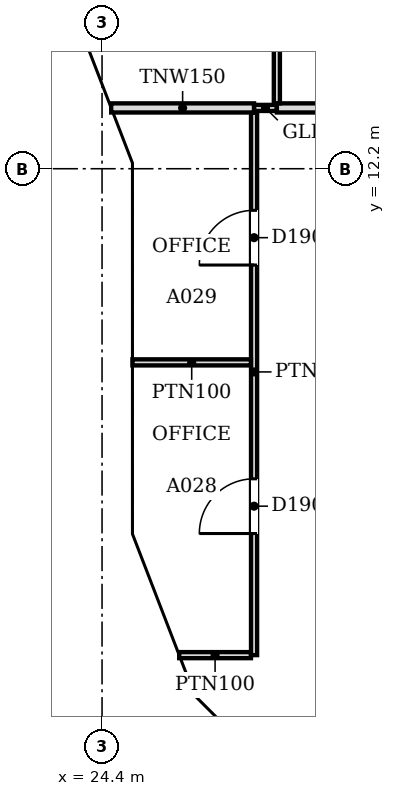
"""IFC4 building model, lengths in metres.
Left out: names, types, materials, properties, quantities, classifications, styles, units other than length and angle.
Written with IfcOpenShell. Run it as: python <this file> out.ifc"""

import sys

from ifc_helpers import new_model, si_unit, direction, frame, frame_2d, origin, place, context, subcontext, project, spatial, polyline, rectangle, outline, extrude, faceted_brep, source, transform, mapped, element, fill, save


model = new_model("IFC4")
c1 = context("Model", 3, precision=1e-05, world=origin(), true_north=direction((0.0, 1.0)))
c2 = subcontext(c1, "Body", "Model", "MODEL_VIEW")
j1 = project(units=[si_unit("LENGTHUNIT", "METRE"), si_unit("PLANEANGLEUNIT", "RADIAN")], contexts=[c1])
p1 = place(None, origin())
s1 = spatial("IfcSite", under=j1, at=p1, CompositionType="ELEMENT")
p2 = place(p1, origin())
s2 = spatial("IfcBuilding", under=s1, at=p2, CompositionType="ELEMENT")
p3 = place(p2, frame((0.0, 0.0, 112.6)))
s3 = spatial("IfcBuildingStorey", under=s2, at=p3, CompositionType="ELEMENT", Elevation=112.6)
m1 = source(origin(), c2, "Body", "Brep", [
    faceted_brep([(3.156, -0.25, 0.056), (0.106, -0.25, 3.736), (0.106, -0.25, 0.0), (3.156, -0.25, 0.0), (0.0, 0.25, 3.736), (0.053, 0.25, 3.8), (3.202, 0.25, 0.0), (0.0, 0.25, 0.0), (0.053, 0.0, 3.8), (3.202, -0.0, 0.0)], [[[0, 1, 2, 3]], [[4, 5, 6, 7]], [[6, 5, 8, 1, 0, 9]], [[5, 4, 8]], [[7, 6, 9, 3, 2]], [[7, 2, 1, 8, 4]], [[3, 9, 0]]]),
])
p4 = place(p3, frame((23.497, 15.234, 0.0), z_axis=(0.0, 0.0, 1.0), x_axis=(0.359913782069, -0.932985567668, 0.0)))
e1 = element("IfcWall", 1, at=p4, inside=s3, PredefinedType="SOLIDWALL", context=c2, shape_type="MappedRepresentation", body=[
    mapped(m1, transform((0.0, 0.0, 0.0), scale=1.0)),
])
m2 = source(origin(), c2, "Body", "SweptSolid", [
    extrude(outline(polyline([(2.671, 0.25), (0.253, 3.167), (0.253, 0.25), (2.671, 0.25)])), frame((0.0, 0.26, 0.0), z_axis=(0.0, -1.0, 0.0), x_axis=(1.0, 0.0, 0.0)), (0.0, 0.0, 1.0), 0.52),
])
p5 = place(p4, origin())
e2 = element("IfcOpeningElement", 2, at=p5, cuts=e1, PredefinedType="OPENING", context=c2, shape_type="MappedRepresentation", body=[
    mapped(m2, transform((0.0, 0.0, 0.0), scale=1.0)),
])
m3 = source(origin(), c2, "Body", "Brep", [
    faceted_brep([(6.1, -0.25, 0.0), (3.096, -0.25, 3.8), (0.047, -0.25, 0.057), (0.047, -0.25, 0.0), (0.0, 0.25, 0.0), (3.096, 0.25, 3.8), (6.053, 0.25, 0.059), (6.053, 0.25, 0.0), (6.1, -0.0, 0.0), (0.0, 0.0, 0.0)], [[[0, 1, 2, 3]], [[4, 5, 6, 7]], [[6, 5, 1, 0, 8]], [[5, 4, 9, 2, 1]], [[4, 7, 8, 0, 3, 9]], [[9, 3, 2]], [[8, 7, 6]]]),
])
p6 = place(p3, frame((24.65, 12.247, 0.0), z_axis=(0.0, 0.0, 1.0), x_axis=(0.0, -1.0, 0.0)))
e3 = element("IfcWall", 3, at=p6, inside=s3, PredefinedType="SOLIDWALL", context=c2, shape_type="MappedRepresentation", body=[
    mapped(m3, transform((0.0, 0.0, 0.0), scale=1.0)),
])
m4 = source(origin(), c2, "Body", "SweptSolid", [
    extrude(outline(polyline([(5.584, 0.25), (3.094, 3.4), (0.526, 0.25), (5.584, 0.25)])), frame((0.0, 0.26, 0.0), z_axis=(0.0, -1.0, 0.0), x_axis=(1.0, 0.0, 0.0)), (0.0, 0.0, 1.0), 0.52),
])
p7 = place(p6, origin())
e4 = element("IfcOpeningElement", 4, at=p7, cuts=e3, PredefinedType="OPENING", context=c2, shape_type="MappedRepresentation", body=[
    mapped(m4, transform((0.0, 0.0, 0.0), scale=1.0)),
])
m5 = source(origin(), c2, "Body", "Brep", [
    faceted_brep([(3.003, -0.25, 3.731), (2.95, -0.25, 3.8), (0.0, -0.25, 0.0), (3.003, -0.25, 0.0), (0.047, 0.25, 0.06), (2.898, 0.25, 3.732), (2.898, 0.25, 0.0), (0.047, 0.25, 0.0), (2.95, 0.0, 3.8), (0.0, 0.0, 0.0)], [[[0, 1, 2, 3]], [[4, 5, 6, 7]], [[8, 1, 0]], [[5, 4, 9, 2, 1, 8]], [[7, 6, 3, 2, 9]], [[7, 9, 4]], [[3, 6, 5, 8, 0]]]),
])
p8 = place(p3, frame((24.65, 6.146, 0.0), z_axis=(0.0, 0.0, 1.0), x_axis=(0.359953949349, -0.932970071518, 0.0)))
e5 = element("IfcWall", 5, at=p8, inside=s3, PredefinedType="SOLIDWALL", context=c2, shape_type="MappedRepresentation", body=[
    mapped(m5, transform((0.0, 0.0, 0.0), scale=1.0)),
])
m6 = source(origin(), c2, "Body", "SweptSolid", [
    extrude(outline(polyline([(2.75, 3.135), (0.511, 0.25), (2.75, 0.25), (2.75, 3.135)])), frame((0.0, 0.26, 0.0), z_axis=(0.0, -1.0, 0.0), x_axis=(1.0, 0.0, 0.0)), (0.0, 0.0, 1.0), 0.52),
])
p9 = place(p8, origin())
e6 = element("IfcOpeningElement", 6, at=p9, cuts=e5, PredefinedType="OPENING", context=c2, shape_type="MappedRepresentation", body=[
    mapped(m6, transform((0.0, 0.0, 0.0), scale=1.0)),
])
m7 = source(origin(), c2, "Body", "Brep", [
    faceted_brep([(2.997, -0.25, 0.0), (0.053, -0.25, 3.8), (0.0, -0.25, 3.732), (0.0, -0.25, 0.0), (0.106, 0.25, 3.731), (2.944, 0.25, 0.068), (2.944, 0.25, 0.0), (0.106, 0.25, 0.0), (0.053, 0.0, 3.8), (2.997, 0.0, 0.0)], [[[0, 1, 2, 3]], [[4, 5, 6, 7]], [[5, 4, 8, 1, 0, 9]], [[2, 1, 8]], [[7, 6, 9, 0, 3]], [[7, 3, 2, 8, 4]], [[9, 6, 5]]]),
])
p10 = place(p3, frame((25.675, 3.431, 0.0), z_axis=(0.0, 0.0, 1.0), x_axis=(0.707106781187, -0.707106781187, 0.0)))
e7 = element("IfcWall", 7, at=p10, inside=s3, PredefinedType="SOLIDWALL", context=c2, shape_type="MappedRepresentation", body=[
    mapped(m7, transform((0.0, 0.0, 0.0), scale=1.0)),
])
m8 = source(origin(), c2, "Body", "SweptSolid", [
    extrude(outline(polyline([(2.487, 0.25), (0.253, 3.134), (0.253, 0.25), (2.487, 0.25)])), frame((0.0, 0.26, 0.0), z_axis=(0.0, -1.0, 0.0), x_axis=(1.0, 0.0, 0.0)), (0.0, 0.0, 1.0), 0.52),
])
p11 = place(p10, origin())
e8 = element("IfcOpeningElement", 8, at=p11, cuts=e7, PredefinedType="OPENING", context=c2, shape_type="MappedRepresentation", body=[
    mapped(m8, transform((0.0, 0.0, 0.0), scale=1.0)),
])
p12 = place(p2, frame((0.0, 0.0, 116.4)))
s4 = spatial("IfcBuildingStorey", under=s2, at=p12, CompositionType="ELEMENT", Elevation=116.4)
m9 = source(origin(), c2, "Body", "Brep", [
    faceted_brep([(3.103, -0.25, 7.544), (0.053, -0.25, 3.864), (0.053, -0.25, 3.736), (3.103, -0.25, 0.056), (0.0, 0.25, 3.8), (3.149, 0.25, 7.6), (3.196, 0.25, 7.543), (3.196, 0.25, 0.057), (3.149, 0.25, 0.0), (3.149, -0.0, 0.0), (3.149, -0.0, 7.6), (0.0, 0.0, 3.8)], [[[0, 1, 2, 3]], [[4, 5, 6, 7, 8]], [[8, 7, 9]], [[6, 5, 10]], [[5, 4, 11, 1, 0, 10]], [[4, 8, 9, 3, 2, 11]], [[11, 2, 1]], [[3, 9, 7, 6, 10, 0]]]),
])
p13 = place(p12, frame((23.517, 15.185, -3.8), z_axis=(0.0, 0.0, 1.0), x_axis=(0.359864468756, -0.933004589553, 0.0)))
e9 = element("IfcWall", 9, at=p13, inside=s4, PredefinedType="SOLIDWALL", context=c2, shape_type="MappedRepresentation", body=[
    mapped(m9, transform((0.0, 0.0, 0.0), scale=1.0)),
])
m10 = source(origin(), c2, "Body", "SweptSolid", [
    extrude(outline(polyline([(2.949, 6.967), (0.325, 3.8), (2.949, 0.633), (2.949, 6.967)])), frame((0.0, 0.26, 0.0), z_axis=(0.0, -1.0, 0.0), x_axis=(1.0, 0.0, 0.0)), (0.0, 0.0, 1.0), 0.52),
])
p14 = place(p13, origin())
e10 = element("IfcOpeningElement", 10, at=p14, cuts=e9, PredefinedType="OPENING", context=c2, shape_type="MappedRepresentation", body=[
    mapped(m10, transform((0.0, 0.0, 0.0), scale=1.0)),
])
m11 = source(origin(), c2, "Body", "Brep", [
    faceted_brep([(0.093, -0.25, 0.057), (3.143, -0.25, 3.8), (0.093, -0.25, 7.543), (0.0, 0.25, 7.544), (0.047, 0.25, 7.6), (3.143, 0.25, 3.8), (0.047, 0.25, 0.0), (0.0, 0.25, 0.056), (0.047, 0.0, 0.0), (0.047, 0.0, 7.6)], [[[0, 1, 2]], [[3, 4, 5, 6, 7]], [[6, 5, 1, 0, 8]], [[5, 4, 9, 2, 1]], [[4, 3, 9]], [[7, 6, 8]], [[7, 8, 0, 2, 9, 3]]]),
])
p15 = place(p12, frame((24.65, 12.293, -3.8), z_axis=(0.0, 0.0, 1.0), x_axis=(0.0, -1.0, 0.0)))
e11 = element("IfcWall", 11, at=p15, inside=s4, PredefinedType="SOLIDWALL", context=c2, shape_type="MappedRepresentation", body=[
    mapped(m11, transform((0.0, 0.0, 0.0), scale=1.0)),
])
m12 = source(origin(), c2, "Body", "SweptSolid", [
    extrude(outline(polyline([(0.247, 0.641), (2.821, 3.8), (0.247, 6.959), (0.247, 0.641)])), frame((0.0, 0.26, 0.0), z_axis=(0.0, -1.0, 0.0), x_axis=(1.0, 0.0, 0.0)), (0.0, 0.0, 1.0), 0.52),
])
p16 = place(p15, origin())
e12 = element("IfcOpeningElement", 12, at=p16, cuts=e11, PredefinedType="OPENING", context=c2, shape_type="MappedRepresentation", body=[
    mapped(m12, transform((0.0, 0.0, 0.0), scale=1.0)),
])
m13 = source(origin(), c2, "Body", "Brep", [
    faceted_brep([(3.003, -0.25, 0.0), (3.05, -0.25, 0.06), (3.05, -0.25, 7.54), (3.003, -0.25, 7.6), (0.0, -0.25, 3.8), (0.0, 0.25, 3.8), (2.957, 0.25, 7.541), (2.957, 0.25, 0.059), (3.003, 0.0, 0.0), (3.003, 0.0, 7.6)], [[[0, 1, 2, 3, 4]], [[5, 6, 7]], [[1, 0, 8]], [[9, 3, 2]], [[6, 5, 4, 3, 9]], [[5, 7, 8, 0, 4]], [[1, 8, 7, 6, 9, 2]]]),
])
p17 = place(p12, frame((24.65, 9.15, -3.8), z_axis=(0.0, 0.0, 1.0), x_axis=(0.0, -1.0, 0.0)))
e13 = element("IfcWall", 13, at=p17, inside=s4, PredefinedType="SOLIDWALL", context=c2, shape_type="MappedRepresentation", body=[
    mapped(m13, transform((0.0, 0.0, 0.0), scale=1.0)),
])
m14 = source(origin(), c2, "Body", "SweptSolid", [
    extrude(outline(polyline([(2.803, 6.944), (0.319, 3.8), (2.803, 0.656), (2.803, 6.944)])), frame((0.0, 0.26, 0.0), z_axis=(0.0, -1.0, 0.0), x_axis=(1.0, 0.0, 0.0)), (0.0, 0.0, 1.0), 0.52),
])
p18 = place(p17, origin())
e14 = element("IfcOpeningElement", 14, at=p18, cuts=e13, PredefinedType="OPENING", context=c2, shape_type="MappedRepresentation", body=[
    mapped(m14, transform((0.0, 0.0, 0.0), scale=1.0)),
])
m15 = source(origin(), c2, "Body", "Brep", [
    faceted_brep([(0.047, -0.25, 0.0), (2.997, -0.25, 3.8), (0.047, -0.25, 7.6), (0.0, -0.25, 7.541), (0.0, -0.25, 0.059), (0.093, 0.25, 7.54), (2.944, 0.25, 3.868), (2.944, 0.25, 3.732), (0.093, 0.25, 0.06), (2.997, 0.0, 3.8), (0.047, 0.0, 0.0), (0.047, 0.0, 7.6)], [[[0, 1, 2, 3, 4]], [[5, 6, 7, 8]], [[8, 7, 9, 1, 0, 10]], [[6, 5, 11, 2, 1, 9]], [[3, 2, 11]], [[10, 0, 4]], [[8, 10, 4, 3, 11, 5]], [[9, 7, 6]]]),
])
p19 = place(p12, frame((24.633, 6.19, -3.8), z_axis=(0.0, 0.0, 1.0), x_axis=(0.359901446078, -0.932990326376, 0.0)))
e15 = element("IfcWall", 15, at=p19, inside=s4, PredefinedType="SOLIDWALL", context=c2, shape_type="MappedRepresentation", body=[
    mapped(m15, transform((0.0, 0.0, 0.0), scale=1.0)),
])
m16 = source(origin(), c2, "Body", "SweptSolid", [
    extrude(outline(polyline([(0.247, 0.665), (2.681, 3.8), (0.247, 6.935), (0.247, 0.665)])), frame((0.0, 0.26, 0.0), z_axis=(0.0, -1.0, 0.0), x_axis=(1.0, 0.0, 0.0)), (0.0, 0.0, 1.0), 0.52),
])
p20 = place(p19, origin())
e16 = element("IfcOpeningElement", 16, at=p20, cuts=e15, PredefinedType="OPENING", context=c2, shape_type="MappedRepresentation", body=[
    mapped(m16, transform((0.0, 0.0, 0.0), scale=1.0)),
])
m17 = source(origin(), c2, "Body", "Brep", [
    faceted_brep([(2.944, -0.25, 0.0), (2.997, -0.25, 0.068), (2.997, -0.25, 7.532), (2.944, -0.25, 7.6), (0.0, -0.25, 3.8), (0.053, 0.25, 3.868), (2.891, 0.25, 7.532), (2.891, 0.25, 0.068), (0.053, 0.25, 3.731), (2.944, 0.0, 0.0), (2.944, 0.0, 7.6), (0.0, 0.0, 3.8)], [[[0, 1, 2, 3, 4]], [[5, 6, 7, 8]], [[1, 0, 9]], [[10, 3, 2]], [[6, 5, 11, 4, 3, 10]], [[8, 7, 9, 0, 4, 11]], [[8, 11, 5]], [[1, 9, 7, 6, 10, 2]]]),
])
p21 = place(p12, frame((25.712, 3.394, -3.8), z_axis=(0.0, 0.0, 1.0), x_axis=(0.707066050402, -0.707147509625, 0.0)))
e17 = element("IfcWall", 17, at=p21, inside=s4, PredefinedType="SOLIDWALL", context=c2, shape_type="MappedRepresentation", body=[
    mapped(m17, transform((0.0, 0.0, 0.0), scale=1.0)),
])
m18 = source(origin(), c2, "Body", "SweptSolid", [
    extrude(outline(polyline([(2.744, 6.934), (0.316, 3.8), (2.744, 0.666), (2.744, 6.934)])), frame((0.0, 0.26, 0.0), z_axis=(0.0, -1.0, 0.0), x_axis=(1.0, 0.0, 0.0)), (0.0, 0.0, 1.0), 0.52),
])
p22 = place(p21, origin())
e18 = element("IfcOpeningElement", 18, at=p22, cuts=e17, PredefinedType="OPENING", context=c2, shape_type="MappedRepresentation", body=[
    mapped(m18, transform((0.0, 0.0, 0.0), scale=1.0)),
])
p23 = place(p3, frame((25.669, 4.2, 0.0), z_axis=(0.0, 0.0, 1.0), x_axis=(1.0, 0.0, 0.0)))
e19 = element("IfcWall", 19, at=p23, inside=s3, PredefinedType="PARTITIONING", context=c2, shape_type="SweptSolid", body=[
    extrude(rectangle(XDim=1.18, YDim=0.1, at=frame_2d((0.59, 0.0))), origin(), (0.0, 0.0, 1.0), 3.067),
])
p24 = place(p3, frame((26.9, 4.2, 0.0), z_axis=(0.0, 0.0, 1.0), x_axis=(0.0, 1.0, 0.0)))
e20 = element("IfcWall", 20, at=p24, inside=s3, PredefinedType="PARTITIONING", context=c2, shape_type="SweptSolid", body=[
    extrude(rectangle(XDim=8.924, YDim=0.1, at=frame_2d((4.462, 0.0))), origin(), (0.0, 0.0, 1.0), 3.067),
])
m19 = source(origin(), c2, "Body", "SweptSolid", [
    extrude(rectangle(XDim=0.9, YDim=2.1, at=frame_2d((0.45, 1.05))), frame((0.0, 0.06, 0.0), z_axis=(0.0, -1.0, 0.0), x_axis=(1.0, 0.0, 0.0)), (0.0, 0.0, 1.0), 0.12),
])
p25 = place(p24, frame((6.416, 0.0, 0.0)))
e21 = element("IfcOpeningElement", 21, at=p25, cuts=e20, PredefinedType="OPENING", context=c2, shape_type="MappedRepresentation", body=[
    mapped(m19, transform((0.0, 0.0, 0.0), scale=1.0)),
])
p26 = place(p24, frame((2.0, 0.0, 0.0)))
e22 = element("IfcOpeningElement", 22, at=p26, cuts=e20, PredefinedType="OPENING", context=c2, shape_type="MappedRepresentation", body=[
    mapped(m19, transform((0.0, 0.0, 0.0), scale=1.0)),
])
p27 = place(p3, frame((24.9, 9.015, 0.0), z_axis=(0.0, 0.0, 1.0), x_axis=(1.0, 0.0, 0.0)))
e23 = element("IfcWall", 23, at=p27, inside=s3, PredefinedType="PARTITIONING", context=c2, shape_type="SweptSolid", body=[
    extrude(rectangle(XDim=1.949, YDim=0.1, at=frame_2d((0.975, 0.0))), origin(), (0.0, 0.0, 1.0), 3.067),
])
p28 = place(p3, frame((24.55, 13.2, 0.0), z_axis=(0.0, 0.0, 1.0), x_axis=(1.0, 0.0, 0.0)))
e24 = element("IfcWall", 24, at=p28, inside=s3, PredefinedType="PARTITIONING", context=c2, shape_type="SweptSolid", body=[
    extrude(rectangle(XDim=2.35, YDim=0.15, at=frame_2d((1.175, 0.0))), origin(), (0.0, 0.0, 1.0), 3.067),
])
p29 = place(p3, frame((26.901, 13.2, 0.0), z_axis=(0.0, 0.0, 1.0), x_axis=(1.0, 0.0, 0.0)))
e25 = element("IfcWall", 25, at=p29, inside=s3, PredefinedType="PARTITIONING", context=c2, shape_type="SweptSolid", body=[
    extrude(rectangle(XDim=0.373, YDim=0.1, at=frame_2d((0.187, 0.0))), origin(), (0.0, 0.0, 1.0), 3.067),
])
p30 = place(p3, frame((27.275, 13.2, 0.0), z_axis=(0.0, 0.0, 1.0), x_axis=(1.0, 0.0, 0.0)))
e26 = element("IfcWall", 26, at=p30, inside=s3, PredefinedType="PARTITIONING", context=c2, shape_type="SweptSolid", body=[
    extrude(rectangle(XDim=16.649, YDim=0.15, at=frame_2d((8.325, 0.0))), origin(), (0.0, 0.0, 1.0), 3.067),
])
p31 = place(p3, frame((27.275, 13.276, 0.0), z_axis=(0.0, 0.0, 1.0), x_axis=(0.0, 1.0, 0.0)))
e27 = element("IfcWall", 27, at=p31, inside=s3, PredefinedType="PARTITIONING", context=c2, shape_type="SweptSolid", body=[
    extrude(rectangle(XDim=5.448, YDim=0.1, at=frame_2d((2.724, 0.0))), origin(), (0.0, 0.0, 1.0), 3.067),
])
p32 = place(p31, frame((2.3, 0.0, 0.0)))
e28 = element("IfcOpeningElement", 28, at=p32, cuts=e27, PredefinedType="OPENING", context=c2, shape_type="MappedRepresentation", body=[
    mapped(m19, transform((0.0, 0.0, 0.0), scale=1.0)),
])
m20 = source(origin(), c2, "Body", "SweptSolid", [
    extrude(rectangle(XDim=0.9, YDim=2.1, at=frame_2d((0.45, 1.05))), frame((0.0, 0.025, 0.0), z_axis=(0.0, -1.0, 0.0), x_axis=(1.0, 0.0, 0.0)), (0.0, 0.0, 1.0), 0.05),
])
p33 = place(p25, origin())
e29 = element("IfcDoor", 29, at=p33, inside=s3, OperationType="SINGLE_SWING_LEFT", PredefinedType="DOOR", context=c2, shape_type="MappedRepresentation", body=[
    mapped(m20, transform((0.0, 0.0, 0.0), scale=1.0)),
])
fill(e21, e29)
p34 = place(p26, origin())
e30 = element("IfcDoor", 30, at=p34, inside=s3, OperationType="SINGLE_SWING_LEFT", PredefinedType="DOOR", context=c2, shape_type="MappedRepresentation", body=[
    mapped(m20, transform((0.0, 0.0, 0.0), scale=1.0)),
])
fill(e22, e30)
save(model, sys.argv[1])
